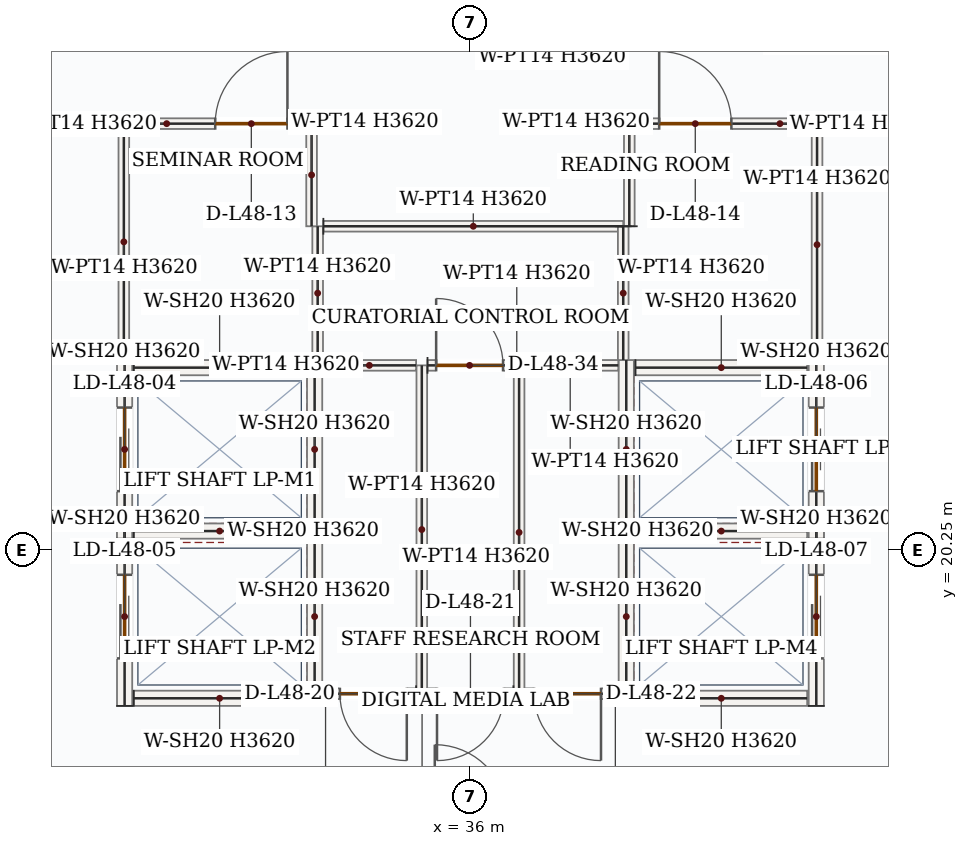
"""IFC4 building model, lengths in metres.
Left out: names, types, materials, properties, quantities, classifications, styles, units other than length and angle.
Written with IfcOpenShell. Run it as: python <this file> out.ifc"""

import sys

from ifc_helpers import new_model, si_unit, direction, frame, frame_2d, origin, place, context, subcontext, project, spatial, rectangle, extrude, source, transform, mapped, element, fill, save


model = new_model("IFC4")
c1 = context("Model", 3, precision=1e-05, world=origin(), true_north=direction((0.0, 1.0)))
c2 = subcontext(c1, "Body", "Model", "MODEL_VIEW")
j1 = project(units=[si_unit("LENGTHUNIT", "METRE"), si_unit("PLANEANGLEUNIT", "RADIAN")], contexts=[c1])
p1 = place(None, origin())
s1 = spatial("IfcSite", under=j1, at=p1, CompositionType="ELEMENT")
p2 = place(p1, origin())
s2 = spatial("IfcBuilding", under=s1, at=p2, CompositionType="ELEMENT")
p3 = place(p2, frame((0.0, 0.0, 205.8)))
s3 = spatial("IfcBuildingStorey", under=s2, at=p3, CompositionType="ELEMENT", Elevation=205.8)
p4 = place(p3, frame((31.45, 20.4, 0.0), z_axis=(0.0, 0.0, 1.0), x_axis=(0.0, 1.0, 0.0)))
e1 = element("IfcWall", 1, at=p4, inside=s3, PredefinedType="SOLIDWALL", context=c2, shape_type="SweptSolid", body=[
    extrude(rectangle(XDim=2.35, YDim=0.2, at=frame_2d((1.175, 0.0))), origin(), (0.0, 0.0, 1.0), 3.62),
])
p5 = place(p4, frame((0.625, 0.0, 0.0)))
e2 = element("IfcOpeningElement", 2, at=p5, cuts=e1, PredefinedType="OPENING", context=c2, shape_type="SweptSolid", body=[
    extrude(rectangle(XDim=1.1, YDim=2.15, at=frame_2d((0.55, 1.075))), frame((0.0, 0.11, 0.0), z_axis=(0.0, -1.0, 0.0), x_axis=(1.0, 0.0, 0.0)), (0.0, 0.0, 1.0), 0.22),
])
m1 = source(origin(), c2, "Body", "SweptSolid", [
    extrude(rectangle(XDim=2.35, YDim=0.2, at=frame_2d((1.175, 0.0))), origin(), (0.0, 0.0, 1.0), 3.62),
])
p6 = place(p3, frame((33.95, 20.4, 0.0), z_axis=(0.0, 0.0, 1.0), x_axis=(0.0, 1.0, 0.0)))
e3 = element("IfcWall", 3, at=p6, inside=s3, PredefinedType="SOLIDWALL", context=c2, shape_type="MappedRepresentation", body=[
    mapped(m1, transform((0.0, 0.0, 0.0), x_axis=(1.0, 0.0, 0.0), y_axis=(0.0, 1.0, 0.0), z_axis=(0.0, 0.0, 1.0), scale=1.0)),
])
m2 = source(origin(), c2, "Body", "SweptSolid", [
    extrude(rectangle(XDim=2.26, YDim=0.2, at=frame_2d((1.13, 0.0))), origin(), (0.0, 0.0, 1.0), 3.62),
])
for number, where, z_axis, x_axis in (
    (4, (31.57, 20.5, 0.0), (0.0, 0.0, 1.0), (1.0, 0.0, 0.0)),
    (5, (31.57, 22.65, 0.0), (0.0, 0.0, 1.0), (1.0, 0.0, 0.0)),
):
    element("IfcWall", number, at=place(p3, frame(where, z_axis=z_axis, x_axis=x_axis)), inside=s3, PredefinedType="SOLIDWALL", context=c2, shape_type="MappedRepresentation", body=[
        mapped(m2, transform((0.0, 0.0, 0.0), x_axis=(1.0, 0.0, 0.0), y_axis=(0.0, 1.0, 0.0), z_axis=(0.0, 0.0, 1.0), scale=1.0)),
    ])
p7 = place(p3, frame((31.45, 18.2, 0.0), z_axis=(0.0, 0.0, 1.0), x_axis=(0.0, 1.0, 0.0)))
e6 = element("IfcWall", 6, at=p7, inside=s3, PredefinedType="SOLIDWALL", context=c2, shape_type="SweptSolid", body=[
    extrude(rectangle(XDim=2.35, YDim=0.2, at=frame_2d((1.175, 0.0))), origin(), (0.0, 0.0, 1.0), 3.62),
])
p8 = place(p7, frame((0.625, 0.0, 0.0)))
e7 = element("IfcOpeningElement", 7, at=p8, cuts=e6, PredefinedType="OPENING", context=c2, shape_type="SweptSolid", body=[
    extrude(rectangle(XDim=1.1, YDim=2.15, at=frame_2d((0.55, 1.075))), frame((0.0, 0.11, 0.0), z_axis=(0.0, -1.0, 0.0), x_axis=(1.0, 0.0, 0.0)), (0.0, 0.0, 1.0), 0.22),
])
p9 = place(p3, frame((33.95, 18.2, 0.0), z_axis=(0.0, 0.0, 1.0), x_axis=(0.0, 1.0, 0.0)))
e8 = element("IfcWall", 8, at=p9, inside=s3, PredefinedType="SOLIDWALL", context=c2, shape_type="MappedRepresentation", body=[
    mapped(m1, transform((0.0, 0.0, 0.0), x_axis=(1.0, 0.0, 0.0), y_axis=(0.0, 1.0, 0.0), z_axis=(0.0, 0.0, 1.0), scale=1.0)),
])
p10 = place(p3, frame((31.57, 18.3, 0.0), z_axis=(0.0, 0.0, 1.0), x_axis=(1.0, 0.0, 0.0)))
e9 = element("IfcWall", 9, at=p10, inside=s3, PredefinedType="SOLIDWALL", context=c2, shape_type="MappedRepresentation", body=[
    mapped(m2, transform((0.0, 0.0, 0.0), x_axis=(1.0, 0.0, 0.0), y_axis=(0.0, 1.0, 0.0), z_axis=(0.0, 0.0, 1.0), scale=1.0)),
])
p11 = place(p3, frame((38.05, 20.4, 0.0), z_axis=(0.0, 0.0, 1.0), x_axis=(0.0, 1.0, 0.0)))
e10 = element("IfcWall", 10, at=p11, inside=s3, PredefinedType="SOLIDWALL", context=c2, shape_type="MappedRepresentation", body=[
    mapped(m1, transform((0.0, 0.0, 0.0), x_axis=(1.0, 0.0, 0.0), y_axis=(0.0, 1.0, 0.0), z_axis=(0.0, 0.0, 1.0), scale=1.0)),
])
p12 = place(p3, frame((40.55, 20.4, 0.0), z_axis=(0.0, 0.0, 1.0), x_axis=(0.0, 1.0, 0.0)))
e11 = element("IfcWall", 11, at=p12, inside=s3, PredefinedType="SOLIDWALL", context=c2, shape_type="SweptSolid", body=[
    extrude(rectangle(XDim=2.35, YDim=0.2, at=frame_2d((1.175, 0.0))), origin(), (0.0, 0.0, 1.0), 3.62),
])
p13 = place(p12, frame((0.625, 0.0, 0.0)))
e12 = element("IfcOpeningElement", 12, at=p13, cuts=e11, PredefinedType="OPENING", context=c2, shape_type="SweptSolid", body=[
    extrude(rectangle(XDim=1.1, YDim=2.15, at=frame_2d((0.55, 1.075))), frame((0.0, 0.11, 0.0), z_axis=(0.0, -1.0, 0.0), x_axis=(1.0, 0.0, 0.0)), (0.0, 0.0, 1.0), 0.22),
])
for number, where, z_axis, x_axis in (
    (13, (38.17, 20.5, 0.0), (0.0, 0.0, 1.0), (1.0, 0.0, 0.0)),
    (14, (38.17, 22.65, 0.0), (0.0, 0.0, 1.0), (1.0, 0.0, 0.0)),
):
    element("IfcWall", number, at=place(p3, frame(where, z_axis=z_axis, x_axis=x_axis)), inside=s3, PredefinedType="SOLIDWALL", context=c2, shape_type="MappedRepresentation", body=[
        mapped(m2, transform((0.0, 0.0, 0.0), x_axis=(1.0, 0.0, 0.0), y_axis=(0.0, 1.0, 0.0), z_axis=(0.0, 0.0, 1.0), scale=1.0)),
    ])
p14 = place(p3, frame((38.05, 18.2, 0.0), z_axis=(0.0, 0.0, 1.0), x_axis=(0.0, 1.0, 0.0)))
e15 = element("IfcWall", 15, at=p14, inside=s3, PredefinedType="SOLIDWALL", context=c2, shape_type="MappedRepresentation", body=[
    mapped(m1, transform((0.0, 0.0, 0.0), x_axis=(1.0, 0.0, 0.0), y_axis=(0.0, 1.0, 0.0), z_axis=(0.0, 0.0, 1.0), scale=1.0)),
])
p15 = place(p3, frame((40.55, 18.2, 0.0), z_axis=(0.0, 0.0, 1.0), x_axis=(0.0, 1.0, 0.0)))
e16 = element("IfcWall", 16, at=p15, inside=s3, PredefinedType="SOLIDWALL", context=c2, shape_type="SweptSolid", body=[
    extrude(rectangle(XDim=2.35, YDim=0.2, at=frame_2d((1.175, 0.0))), origin(), (0.0, 0.0, 1.0), 3.62),
])
p16 = place(p15, frame((0.625, 0.0, 0.0)))
e17 = element("IfcOpeningElement", 17, at=p16, cuts=e16, PredefinedType="OPENING", context=c2, shape_type="SweptSolid", body=[
    extrude(rectangle(XDim=1.1, YDim=2.15, at=frame_2d((0.55, 1.075))), frame((0.0, 0.11, 0.0), z_axis=(0.0, -1.0, 0.0), x_axis=(1.0, 0.0, 0.0)), (0.0, 0.0, 1.0), 0.22),
])
p17 = place(p3, frame((38.17, 18.3, 0.0), z_axis=(0.0, 0.0, 1.0), x_axis=(1.0, 0.0, 0.0)))
e18 = element("IfcWall", 18, at=p17, inside=s3, PredefinedType="SOLIDWALL", context=c2, shape_type="MappedRepresentation", body=[
    mapped(m2, transform((0.0, 0.0, 0.0), x_axis=(1.0, 0.0, 0.0), y_axis=(0.0, 1.0, 0.0), z_axis=(0.0, 0.0, 1.0), scale=1.0)),
])
m3 = source(origin(), c2, "Body", "SweptSolid", [
    extrude(rectangle(XDim=4.32, YDim=0.14, at=frame_2d((2.16, 0.0))), origin(), (0.0, 0.0, 1.0), 3.62),
])
p18 = place(p3, frame((35.36, 18.36, 0.0), z_axis=(0.0, 0.0, 1.0), x_axis=(0.0, 1.0, 0.0)))
e19 = element("IfcWall", 19, at=p18, inside=s3, PredefinedType="PARTITIONING", context=c2, shape_type="MappedRepresentation", body=[
    mapped(m3, transform((0.0, 0.0, 0.0), x_axis=(1.0, 0.0, 0.0), y_axis=(0.0, 1.0, 0.0), z_axis=(0.0, 0.0, 1.0), scale=1.0)),
])
p19 = place(p3, frame((35.435, 22.68, 0.0), z_axis=(0.0, 0.0, 1.0), x_axis=(1.0, 0.0, 0.0)))
e20 = element("IfcWall", 20, at=p19, inside=s3, PredefinedType="PARTITIONING", context=c2, shape_type="SweptSolid", body=[
    extrude(rectangle(XDim=1.205, YDim=0.14, at=frame_2d((0.603, 0.0))), origin(), (0.0, 0.0, 1.0), 3.62),
])
p20 = place(p19, frame((0.114, 0.0, 0.0)))
e21 = element("IfcOpeningElement", 21, at=p20, cuts=e20, PredefinedType="OPENING", context=c2, shape_type="SweptSolid", body=[
    extrude(rectangle(XDim=0.88, YDim=2.1, at=frame_2d((0.44, 1.05))), frame((0.0, 0.08, 0.0), z_axis=(0.0, -1.0, 0.0), x_axis=(1.0, 0.0, 0.0)), (0.0, 0.0, 1.0), 0.16),
])
m4 = source(origin(), c2, "Body", "SweptSolid", [
    extrude(rectangle(XDim=4.245, YDim=0.14, at=frame_2d((2.123, 0.0))), origin(), (0.0, 0.0, 1.0), 3.62),
])
p21 = place(p3, frame((36.64, 22.605, 0.0), z_axis=(0.0, 0.0, 1.0), x_axis=(0.0, -1.0, 0.0)))
e22 = element("IfcWall", 22, at=p21, inside=s3, PredefinedType="PARTITIONING", context=c2, shape_type="MappedRepresentation", body=[
    mapped(m4, transform((0.0, 0.0, 0.0), x_axis=(1.0, 0.0, 0.0), y_axis=(0.0, 1.0, 0.0), z_axis=(0.0, 0.0, 1.0), scale=1.0)),
])
p22 = place(p3, frame((36.565, 18.36, 0.0), z_axis=(0.0, 0.0, 1.0), x_axis=(-1.0, 0.0, 0.0)))
e23 = element("IfcWall", 23, at=p22, inside=s3, PredefinedType="PARTITIONING", context=c2, shape_type="SweptSolid", body=[
    extrude(rectangle(XDim=1.13, YDim=0.14, at=frame_2d((0.565, 0.0))), origin(), (0.0, 0.0, 1.0), 3.62),
])
p23 = place(p22, frame((0.125, 0.0, 0.0)))
e24 = element("IfcOpeningElement", 24, at=p23, cuts=e23, PredefinedType="OPENING", context=c2, shape_type="SweptSolid", body=[
    extrude(rectangle(XDim=0.88, YDim=2.1, at=frame_2d((0.44, 1.05))), frame((0.0, 0.08, 0.0), z_axis=(0.0, -1.0, 0.0), x_axis=(1.0, 0.0, 0.0)), (0.0, 0.0, 1.0), 0.16),
])
m5 = source(origin(), c2, "Body", "SweptSolid", [
    extrude(rectangle(XDim=1.23, YDim=0.14, at=frame_2d((0.615, 0.0))), origin(), (0.0, 0.0, 1.0), 3.62),
])
p24 = place(p3, frame((34.055, 22.68, 0.0), z_axis=(0.0, 0.0, 1.0), x_axis=(1.0, 0.0, 0.0)))
e25 = element("IfcWall", 25, at=p24, inside=s3, PredefinedType="PARTITIONING", context=c2, shape_type="MappedRepresentation", body=[
    mapped(m5, transform((0.0, 0.0, 0.0), x_axis=(1.0, 0.0, 0.0), y_axis=(0.0, 1.0, 0.0), z_axis=(0.0, 0.0, 1.0), scale=1.0)),
])
p25 = place(p3, frame((35.285, 18.36, 0.0), z_axis=(0.0, 0.0, 1.0), x_axis=(-1.0, 0.0, 0.0)))
e26 = element("IfcWall", 26, at=p25, inside=s3, PredefinedType="PARTITIONING", context=c2, shape_type="SweptSolid", body=[
    extrude(rectangle(XDim=1.23, YDim=0.14, at=frame_2d((0.615, 0.0))), origin(), (0.0, 0.0, 1.0), 3.62),
])
p26 = place(p25, frame((0.123, 0.0, 0.0)))
e27 = element("IfcOpeningElement", 27, at=p26, cuts=e26, PredefinedType="OPENING", context=c2, shape_type="SweptSolid", body=[
    extrude(rectangle(XDim=0.88, YDim=2.1, at=frame_2d((0.44, 1.05))), frame((0.0, 0.08, 0.0), z_axis=(0.0, -1.0, 0.0), x_axis=(1.0, 0.0, 0.0)), (0.0, 0.0, 1.0), 0.16),
])
m6 = source(origin(), c2, "Body", "SweptSolid", [
    extrude(rectangle(XDim=1.265, YDim=0.14, at=frame_2d((0.633, 0.0))), origin(), (0.0, 0.0, 1.0), 3.62),
])
p27 = place(p3, frame((36.68, 22.68, 0.0), z_axis=(0.0, 0.0, 1.0), x_axis=(1.0, 0.0, 0.0)))
e28 = element("IfcWall", 28, at=p27, inside=s3, PredefinedType="PARTITIONING", context=c2, shape_type="MappedRepresentation", body=[
    mapped(m6, transform((0.0, 0.0, 0.0), x_axis=(1.0, 0.0, 0.0), y_axis=(0.0, 1.0, 0.0), z_axis=(0.0, 0.0, 1.0), scale=1.0)),
])
p28 = place(p3, frame((37.945, 18.36, 0.0), z_axis=(0.0, 0.0, 1.0), x_axis=(-1.0, 0.0, 0.0)))
e29 = element("IfcWall", 29, at=p28, inside=s3, PredefinedType="PARTITIONING", context=c2, shape_type="SweptSolid", body=[
    extrude(rectangle(XDim=1.23, YDim=0.14, at=frame_2d((0.615, 0.0))), origin(), (0.0, 0.0, 1.0), 3.62),
])
p29 = place(p28, frame((0.228, 0.0, 0.0)))
e30 = element("IfcOpeningElement", 30, at=p29, cuts=e29, PredefinedType="OPENING", context=c2, shape_type="SweptSolid", body=[
    extrude(rectangle(XDim=0.88, YDim=2.1, at=frame_2d((0.44, 1.05))), frame((0.0, 0.08, 0.0), z_axis=(0.0, -1.0, 0.0), x_axis=(1.0, 0.0, 0.0)), (0.0, 0.0, 1.0), 0.16),
])
m7 = source(origin(), c2, "Body", "SweptSolid", [
    extrude(rectangle(XDim=1.76, YDim=0.14, at=frame_2d((0.88, 0.0))), origin(), (0.0, 0.0, 1.0), 3.62),
])
p30 = place(p3, frame((33.99, 22.75, 0.0), z_axis=(0.0, 0.0, 1.0), x_axis=(0.0, 1.0, 0.0)))
e31 = element("IfcWall", 31, at=p30, inside=s3, PredefinedType="PARTITIONING", context=c2, shape_type="MappedRepresentation", body=[
    mapped(m7, transform((0.0, 0.0, 0.0), x_axis=(1.0, 0.0, 0.0), y_axis=(0.0, 1.0, 0.0), z_axis=(0.0, 0.0, 1.0), scale=1.0)),
])
m8 = source(origin(), c2, "Body", "SweptSolid", [
    extrude(rectangle(XDim=3.945, YDim=0.14, at=frame_2d((1.973, 0.0))), origin(), (0.0, 0.0, 1.0), 3.62),
])
p31 = place(p3, frame((34.065, 24.51, 0.0), z_axis=(0.0, 0.0, 1.0), x_axis=(1.0, 0.0, 0.0)))
e32 = element("IfcWall", 32, at=p31, inside=s3, PredefinedType="PARTITIONING", context=c2, shape_type="MappedRepresentation", body=[
    mapped(m8, transform((0.0, 0.0, 0.0), x_axis=(1.0, 0.0, 0.0), y_axis=(0.0, 1.0, 0.0), z_axis=(0.0, 0.0, 1.0), scale=1.0)),
])
p32 = place(p3, frame((38.01, 24.51, 0.0), z_axis=(0.0, 0.0, 1.0), x_axis=(0.0, -1.0, 0.0)))
e33 = element("IfcWall", 33, at=p32, inside=s3, PredefinedType="PARTITIONING", context=c2, shape_type="MappedRepresentation", body=[
    mapped(m7, transform((0.0, 0.0, 0.0), x_axis=(1.0, 0.0, 0.0), y_axis=(0.0, 1.0, 0.0), z_axis=(0.0, 0.0, 1.0), scale=1.0)),
])
m9 = source(origin(), c2, "Body", "SweptSolid", [
    extrude(rectangle(XDim=3.11, YDim=0.14, at=frame_2d((1.555, 0.0))), origin(), (0.0, 0.0, 1.0), 3.62),
])
p33 = place(p3, frame((31.44, 22.75, 0.0), z_axis=(0.0, 0.0, 1.0), x_axis=(0.0, 1.0, 0.0)))
e34 = element("IfcWall", 34, at=p33, inside=s3, PredefinedType="PARTITIONING", context=c2, shape_type="MappedRepresentation", body=[
    mapped(m9, transform((0.0, 0.0, 0.0), x_axis=(1.0, 0.0, 0.0), y_axis=(0.0, 1.0, 0.0), z_axis=(0.0, 0.0, 1.0), scale=1.0)),
])
p34 = place(p3, frame((31.515, 25.86, 0.0), z_axis=(0.0, 0.0, 1.0), x_axis=(1.0, 0.0, 0.0)))
e35 = element("IfcWall", 35, at=p34, inside=s3, PredefinedType="PARTITIONING", context=c2, shape_type="SweptSolid", body=[
    extrude(rectangle(XDim=2.395, YDim=0.14, at=frame_2d((1.198, 0.0))), origin(), (0.0, 0.0, 1.0), 3.62),
])
p35 = place(p34, frame((1.127, 0.0, 0.0)))
e36 = element("IfcOpeningElement", 36, at=p35, cuts=e35, PredefinedType="OPENING", context=c2, shape_type="SweptSolid", body=[
    extrude(rectangle(XDim=0.95, YDim=2.15, at=frame_2d((0.475, 1.075))), frame((0.0, 0.08, 0.0), z_axis=(0.0, -1.0, 0.0), x_axis=(1.0, 0.0, 0.0)), (0.0, 0.0, 1.0), 0.16),
])
m10 = source(origin(), c2, "Body", "SweptSolid", [
    extrude(rectangle(XDim=1.35, YDim=0.14, at=frame_2d((0.675, 0.0))), origin(), (0.0, 0.0, 1.0), 3.62),
])
for number, where, z_axis, x_axis in (
    (37, (33.91, 25.86, 0.0), (0.0, 0.0, 1.0), (0.0, -1.0, 0.0)),
    (38, (38.09, 24.51, 0.0), (0.0, 0.0, 1.0), (0.0, 1.0, 0.0)),
):
    element("IfcWall", number, at=place(p3, frame(where, z_axis=z_axis, x_axis=x_axis)), inside=s3, PredefinedType="PARTITIONING", context=c2, shape_type="MappedRepresentation", body=[
        mapped(m10, transform((0.0, 0.0, 0.0), x_axis=(1.0, 0.0, 0.0), y_axis=(0.0, 1.0, 0.0), z_axis=(0.0, 0.0, 1.0), scale=1.0)),
    ])
p36 = place(p3, frame((38.165, 25.86, 0.0), z_axis=(0.0, 0.0, 1.0), x_axis=(1.0, 0.0, 0.0)))
e39 = element("IfcWall", 39, at=p36, inside=s3, PredefinedType="PARTITIONING", context=c2, shape_type="SweptSolid", body=[
    extrude(rectangle(XDim=2.395, YDim=0.14, at=frame_2d((1.198, 0.0))), origin(), (0.0, 0.0, 1.0), 3.62),
])
p37 = place(p36, frame((0.318, 0.0, 0.0)))
e40 = element("IfcOpeningElement", 40, at=p37, cuts=e39, PredefinedType="OPENING", context=c2, shape_type="SweptSolid", body=[
    extrude(rectangle(XDim=0.95, YDim=2.15, at=frame_2d((0.475, 1.075))), frame((0.0, 0.08, 0.0), z_axis=(0.0, -1.0, 0.0), x_axis=(1.0, 0.0, 0.0)), (0.0, 0.0, 1.0), 0.16),
])
m11 = source(origin(), c2, "Body", "SweptSolid", [
    extrude(rectangle(XDim=3.035, YDim=0.14, at=frame_2d((1.518, 0.0))), origin(), (0.0, 0.0, 1.0), 3.62),
])
p38 = place(p3, frame((40.56, 25.785, 0.0), z_axis=(0.0, 0.0, 1.0), x_axis=(0.0, -1.0, 0.0)))
e41 = element("IfcWall", 41, at=p38, inside=s3, PredefinedType="PARTITIONING", context=c2, shape_type="MappedRepresentation", body=[
    mapped(m11, transform((0.0, 0.0, 0.0), x_axis=(1.0, 0.0, 0.0), y_axis=(0.0, 1.0, 0.0), z_axis=(0.0, 0.0, 1.0), scale=1.0)),
])
m12 = source(origin(), c2, "Body", "SweptSolid", [
    extrude(rectangle(XDim=1.1, YDim=2.15, at=frame_2d((0.55, 1.075))), frame((0.0, 0.025, 0.0), z_axis=(0.0, -1.0, 0.0), x_axis=(1.0, 0.0, 0.0)), (0.0, 0.0, 1.0), 0.05),
])
p39 = place(p5, origin())
e42 = element("IfcDoor", 42, at=p39, inside=s3, OperationType="DOUBLE_DOOR_SLIDING", PredefinedType="DOOR", context=c2, shape_type="MappedRepresentation", body=[
    mapped(m12, transform((0.0, 0.0, 0.0), x_axis=(1.0, 0.0, 0.0), y_axis=(0.0, 1.0, 0.0), z_axis=(0.0, 0.0, 1.0), scale=1.0)),
])
fill(e2, e42)
p40 = place(p8, origin())
e43 = element("IfcDoor", 43, at=p40, inside=s3, OperationType="DOUBLE_DOOR_SLIDING", PredefinedType="DOOR", context=c2, shape_type="MappedRepresentation", body=[
    mapped(m12, transform((0.0, 0.0, 0.0), x_axis=(1.0, 0.0, 0.0), y_axis=(0.0, 1.0, 0.0), z_axis=(0.0, 0.0, 1.0), scale=1.0)),
])
fill(e7, e43)
p41 = place(p13, origin())
e44 = element("IfcDoor", 44, at=p41, inside=s3, OperationType="DOUBLE_DOOR_SLIDING", PredefinedType="DOOR", context=c2, shape_type="MappedRepresentation", body=[
    mapped(m12, transform((0.0, 0.0, 0.0), x_axis=(1.0, 0.0, 0.0), y_axis=(0.0, 1.0, 0.0), z_axis=(0.0, 0.0, 1.0), scale=1.0)),
])
fill(e12, e44)
p42 = place(p16, origin())
e45 = element("IfcDoor", 45, at=p42, inside=s3, OperationType="DOUBLE_DOOR_SLIDING", PredefinedType="DOOR", context=c2, shape_type="MappedRepresentation", body=[
    mapped(m12, transform((0.0, 0.0, 0.0), x_axis=(1.0, 0.0, 0.0), y_axis=(0.0, 1.0, 0.0), z_axis=(0.0, 0.0, 1.0), scale=1.0)),
])
fill(e17, e45)
m13 = source(origin(), c2, "Body", "SweptSolid", [
    extrude(rectangle(XDim=0.95, YDim=2.15, at=frame_2d((0.475, 1.075))), frame((0.0, 0.025, 0.0), z_axis=(0.0, -1.0, 0.0), x_axis=(1.0, 0.0, 0.0)), (0.0, 0.0, 1.0), 0.05),
])
p43 = place(p35, origin())
e46 = element("IfcDoor", 46, at=p43, inside=s3, OperationType="SINGLE_SWING_RIGHT", PredefinedType="DOOR", context=c2, shape_type="MappedRepresentation", body=[
    mapped(m13, transform((0.0, 0.0, 0.0), x_axis=(1.0, 0.0, 0.0), y_axis=(0.0, 1.0, 0.0), z_axis=(0.0, 0.0, 1.0), scale=1.0)),
])
fill(e36, e46)
p44 = place(p37, origin())
e47 = element("IfcDoor", 47, at=p44, inside=s3, OperationType="SINGLE_SWING_LEFT", PredefinedType="DOOR", context=c2, shape_type="MappedRepresentation", body=[
    mapped(m13, transform((0.0, 0.0, 0.0), x_axis=(1.0, 0.0, 0.0), y_axis=(0.0, 1.0, 0.0), z_axis=(0.0, 0.0, 1.0), scale=1.0)),
])
fill(e40, e47)
m14 = source(origin(), c2, "Body", "SweptSolid", [
    extrude(rectangle(XDim=0.88, YDim=2.1, at=frame_2d((0.44, 1.05))), frame((0.0, 0.025, 0.0), z_axis=(0.0, -1.0, 0.0), x_axis=(1.0, 0.0, 0.0)), (0.0, 0.0, 1.0), 0.05),
])
p45 = place(p26, origin())
e48 = element("IfcDoor", 48, at=p45, inside=s3, OperationType="SINGLE_SWING_LEFT", PredefinedType="DOOR", context=c2, shape_type="MappedRepresentation", body=[
    mapped(m14, transform((0.0, 0.0, 0.0), x_axis=(1.0, 0.0, 0.0), y_axis=(0.0, 1.0, 0.0), z_axis=(0.0, 0.0, 1.0), scale=1.0)),
])
fill(e27, e48)
p46 = place(p23, origin())
e49 = element("IfcDoor", 49, at=p46, inside=s3, OperationType="SINGLE_SWING_RIGHT", PredefinedType="DOOR", context=c2, shape_type="MappedRepresentation", body=[
    mapped(m14, transform((0.0, 0.0, 0.0), x_axis=(1.0, 0.0, 0.0), y_axis=(0.0, 1.0, 0.0), z_axis=(0.0, 0.0, 1.0), scale=1.0)),
])
fill(e24, e49)
p47 = place(p29, origin())
e50 = element("IfcDoor", 50, at=p47, inside=s3, OperationType="SINGLE_SWING_LEFT", PredefinedType="DOOR", context=c2, shape_type="MappedRepresentation", body=[
    mapped(m14, transform((0.0, 0.0, 0.0), x_axis=(1.0, 0.0, 0.0), y_axis=(0.0, 1.0, 0.0), z_axis=(0.0, 0.0, 1.0), scale=1.0)),
])
fill(e30, e50)
p48 = place(p20, origin())
e51 = element("IfcDoor", 51, at=p48, inside=s3, OperationType="SINGLE_SWING_LEFT", PredefinedType="DOOR", context=c2, shape_type="MappedRepresentation", body=[
    mapped(m14, transform((0.0, 0.0, 0.0), x_axis=(1.0, 0.0, 0.0), y_axis=(0.0, 1.0, 0.0), z_axis=(0.0, 0.0, 1.0), scale=1.0)),
])
fill(e21, e51)
save(model, sys.argv[1])
